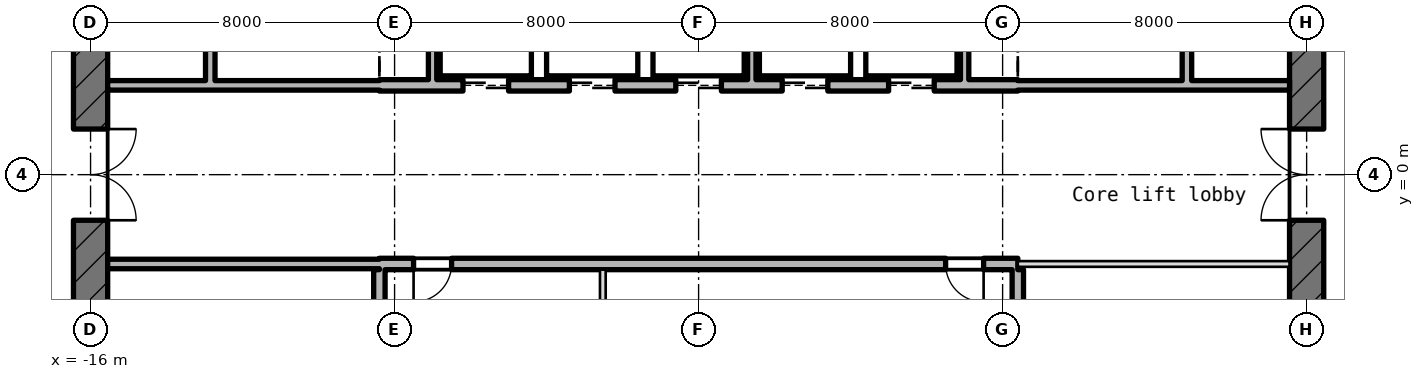
"""IFC4 building model, lengths in metres.
Left out: names, types, materials, properties, quantities, classifications, styles, units other than length and angle.
Written with IfcOpenShell. Run it as: python <this file> out.ifc"""

import sys

from ifc_helpers import new_model, si_unit, direction, frame, frame_2d, origin, place, context, subcontext, project, spatial, rectangle, extrude, element, fill, save


model = new_model("IFC4")
c1 = context("Model", 3, precision=1e-05, world=origin(), true_north=direction((0.0, 1.0)))
c2 = subcontext(c1, "Body", "Model", "MODEL_VIEW")
j1 = project(units=[si_unit("LENGTHUNIT", "METRE"), si_unit("PLANEANGLEUNIT", "RADIAN")], contexts=[c1])
p1 = place(None, origin())
s1 = spatial("IfcSite", under=j1, at=p1, CompositionType="ELEMENT")
p2 = place(p1, origin())
s2 = spatial("IfcBuilding", under=s1, at=p2, CompositionType="ELEMENT")
p3 = place(p2, frame((0.0, 0.0, 223.3)))
s3 = spatial("IfcBuildingStorey", under=s2, at=p3, CompositionType="ELEMENT", Elevation=223.3)
p4 = place(p3, frame((16.0, -10.186, -0.18), z_axis=(0.0, 0.0, 1.0), x_axis=(0.0, 1.0, 0.0)))
e1 = element("IfcWall", 1, at=p4, inside=s3, PredefinedType="SHEAR", context=c2, shape_type="SweptSolid", body=[
    extrude(rectangle(XDim=20.373, YDim=0.9, at=frame_2d((10.186, 0.0))), origin(), (0.0, 0.0, 1.0), 4.15),
])
p5 = place(p4, frame((8.986, 0.0, 0.18)))
e2 = element("IfcOpeningElement", 2, at=p5, cuts=e1, PredefinedType="OPENING", context=c2, shape_type="SweptSolid", body=[
    extrude(rectangle(XDim=2.4, YDim=2.1, at=frame_2d((1.2, 1.05))), frame((0.0, 0.46, 0.0), z_axis=(0.0, -1.0, 0.0), x_axis=(1.0, 0.0, 0.0)), (0.0, 0.0, 1.0), 0.92),
])
p6 = place(p4, frame((13.586, 0.0, 0.18)))
e3 = element("IfcOpeningElement", 3, at=p6, cuts=e1, PredefinedType="OPENING", context=c2, shape_type="SweptSolid", body=[
    extrude(rectangle(XDim=1.2, YDim=2.1, at=frame_2d((0.6, 1.05))), frame((0.0, 0.46, 0.0), z_axis=(0.0, -1.0, 0.0), x_axis=(1.0, 0.0, 0.0)), (0.0, 0.0, 1.0), 0.92),
])
p7 = place(p4, frame((2.4, 0.0, 0.18)))
e4 = element("IfcOpeningElement", 4, at=p7, cuts=e1, PredefinedType="OPENING", context=c2, shape_type="SweptSolid", body=[
    extrude(rectangle(XDim=1.2, YDim=2.1, at=frame_2d((0.6, 1.05))), frame((0.0, 0.46, 0.0), z_axis=(0.0, -1.0, 0.0), x_axis=(1.0, 0.0, 0.0)), (0.0, 0.0, 1.0), 0.92),
])
p8 = place(p3, frame((-16.0, 10.186, -0.18), z_axis=(0.0, 0.0, 1.0), x_axis=(0.0, -1.0, 0.0)))
e5 = element("IfcWall", 5, at=p8, inside=s3, PredefinedType="SHEAR", context=c2, shape_type="SweptSolid", body=[
    extrude(rectangle(XDim=20.373, YDim=0.9, at=frame_2d((10.186, 0.0))), origin(), (0.0, 0.0, 1.0), 4.15),
])
p9 = place(p8, frame((8.986, 0.0, 0.18)))
e6 = element("IfcOpeningElement", 6, at=p9, cuts=e5, PredefinedType="OPENING", context=c2, shape_type="SweptSolid", body=[
    extrude(rectangle(XDim=2.4, YDim=2.1, at=frame_2d((1.2, 1.05))), frame((0.0, 0.46, 0.0), z_axis=(0.0, -1.0, 0.0), x_axis=(1.0, 0.0, 0.0)), (0.0, 0.0, 1.0), 0.92),
])
p10 = place(p8, frame((5.586, 0.0, 0.18)))
e7 = element("IfcOpeningElement", 7, at=p10, cuts=e5, PredefinedType="OPENING", context=c2, shape_type="SweptSolid", body=[
    extrude(rectangle(XDim=1.2, YDim=2.1, at=frame_2d((0.6, 1.05))), frame((0.0, 0.46, 0.0), z_axis=(0.0, -1.0, 0.0), x_axis=(1.0, 0.0, 0.0)), (0.0, 0.0, 1.0), 0.92),
])
p11 = place(p3, frame((-15.55, -2.35, 0.0), z_axis=(0.0, 0.0, 1.0), x_axis=(1.0, 0.0, 0.0)))
e8 = element("IfcWall", 8, at=p11, inside=s3, PredefinedType="STANDARD", context=c2, shape_type="SweptSolid", body=[
    extrude(rectangle(XDim=7.15, YDim=0.25, at=frame_2d((3.575, 0.0))), origin(), (0.0, 0.0, 1.0), 3.97),
])
p12 = place(p3, frame((-8.4, -2.35, -0.18), z_axis=(0.0, 0.0, 1.0), x_axis=(1.0, 0.0, 0.0)))
e9 = element("IfcWall", 9, at=p12, inside=s3, PredefinedType="SHEAR", context=c2, shape_type="SweptSolid", body=[
    extrude(rectangle(XDim=16.8, YDim=0.3, at=frame_2d((8.4, 0.0))), origin(), (0.0, 0.0, 1.0), 4.15),
])
p13 = place(p12, frame((0.9, 0.0, 0.18)))
e10 = element("IfcOpeningElement", 10, at=p13, cuts=e9, PredefinedType="OPENING", context=c2, shape_type="SweptSolid", body=[
    extrude(rectangle(XDim=1.0, YDim=2.1, at=frame_2d((0.5, 1.05))), frame((0.0, 0.16, 0.0), z_axis=(0.0, -1.0, 0.0), x_axis=(1.0, 0.0, 0.0)), (0.0, 0.0, 1.0), 0.32),
])
p14 = place(p12, frame((14.9, 0.0, 0.18)))
e11 = element("IfcOpeningElement", 11, at=p14, cuts=e9, PredefinedType="OPENING", context=c2, shape_type="SweptSolid", body=[
    extrude(rectangle(XDim=1.0, YDim=2.1, at=frame_2d((0.5, 1.05))), frame((0.0, 0.16, 0.0), z_axis=(0.0, -1.0, 0.0), x_axis=(1.0, 0.0, 0.0)), (0.0, 0.0, 1.0), 0.32),
])
p15 = place(p3, frame((8.4, -2.35, 0.0), z_axis=(0.0, 0.0, 1.0), x_axis=(1.0, 0.0, 0.0)))
e12 = element("IfcWall", 12, at=p15, inside=s3, PredefinedType="PARTITIONING", context=c2, shape_type="SweptSolid", body=[
    extrude(rectangle(XDim=7.15, YDim=0.15, at=frame_2d((3.575, 0.0))), origin(), (0.0, 0.0, 1.0), 3.97),
])
p16 = place(p3, frame((-15.55, 2.35, 0.0), z_axis=(0.0, 0.0, 1.0), x_axis=(1.0, 0.0, 0.0)))
e13 = element("IfcWall", 13, at=p16, inside=s3, PredefinedType="STANDARD", context=c2, shape_type="SweptSolid", body=[
    extrude(rectangle(XDim=7.15, YDim=0.25, at=frame_2d((3.575, 0.0))), origin(), (0.0, 0.0, 1.0), 3.97),
])
p17 = place(p3, frame((-8.4, 2.35, -0.18), z_axis=(0.0, 0.0, 1.0), x_axis=(1.0, 0.0, 0.0)))
e14 = element("IfcWall", 14, at=p17, inside=s3, PredefinedType="SHEAR", context=c2, shape_type="SweptSolid", body=[
    extrude(rectangle(XDim=16.8, YDim=0.3, at=frame_2d((8.4, 0.0))), origin(), (0.0, 0.0, 1.0), 4.15),
])
p18 = place(p17, frame((2.2, 0.0, 0.18)))
e15 = element("IfcOpeningElement", 15, at=p18, cuts=e14, PredefinedType="OPENING", context=c2, shape_type="SweptSolid", body=[
    extrude(rectangle(XDim=1.2, YDim=2.1, at=frame_2d((0.6, 1.05))), frame((0.0, 0.16, 0.0), z_axis=(0.0, -1.0, 0.0), x_axis=(1.0, 0.0, 0.0)), (0.0, 0.0, 1.0), 0.32),
])
p19 = place(p17, frame((5.0, 0.0, 0.18)))
e16 = element("IfcOpeningElement", 16, at=p19, cuts=e14, PredefinedType="OPENING", context=c2, shape_type="SweptSolid", body=[
    extrude(rectangle(XDim=1.2, YDim=2.1, at=frame_2d((0.6, 1.05))), frame((0.0, 0.16, 0.0), z_axis=(0.0, -1.0, 0.0), x_axis=(1.0, 0.0, 0.0)), (0.0, 0.0, 1.0), 0.32),
])
p20 = place(p17, frame((7.8, 0.0, 0.18)))
e17 = element("IfcOpeningElement", 17, at=p20, cuts=e14, PredefinedType="OPENING", context=c2, shape_type="SweptSolid", body=[
    extrude(rectangle(XDim=1.2, YDim=2.1, at=frame_2d((0.6, 1.05))), frame((0.0, 0.16, 0.0), z_axis=(0.0, -1.0, 0.0), x_axis=(1.0, 0.0, 0.0)), (0.0, 0.0, 1.0), 0.32),
])
p21 = place(p17, frame((10.6, 0.0, 0.18)))
e18 = element("IfcOpeningElement", 18, at=p21, cuts=e14, PredefinedType="OPENING", context=c2, shape_type="SweptSolid", body=[
    extrude(rectangle(XDim=1.2, YDim=2.1, at=frame_2d((0.6, 1.05))), frame((0.0, 0.16, 0.0), z_axis=(0.0, -1.0, 0.0), x_axis=(1.0, 0.0, 0.0)), (0.0, 0.0, 1.0), 0.32),
])
p22 = place(p17, frame((13.4, 0.0, 0.18)))
e19 = element("IfcOpeningElement", 19, at=p22, cuts=e14, PredefinedType="OPENING", context=c2, shape_type="SweptSolid", body=[
    extrude(rectangle(XDim=1.2, YDim=2.1, at=frame_2d((0.6, 1.05))), frame((0.0, 0.16, 0.0), z_axis=(0.0, -1.0, 0.0), x_axis=(1.0, 0.0, 0.0)), (0.0, 0.0, 1.0), 0.32),
])
p23 = place(p3, frame((8.4, 2.35, 0.0), z_axis=(0.0, 0.0, 1.0), x_axis=(1.0, 0.0, 0.0)))
e20 = element("IfcWall", 20, at=p23, inside=s3, PredefinedType="STANDARD", context=c2, shape_type="SweptSolid", body=[
    extrude(rectangle(XDim=7.15, YDim=0.25, at=frame_2d((3.575, 0.0))), origin(), (0.0, 0.0, 1.0), 3.97),
])
p24 = place(p3, frame((-12.85, 2.475, 0.0), z_axis=(0.0, 0.0, 1.0), x_axis=(0.0, 1.0, 0.0)))
e21 = element("IfcWall", 21, at=p24, inside=s3, PredefinedType="STANDARD", context=c2, shape_type="SweptSolid", body=[
    extrude(rectangle(XDim=3.05, YDim=0.25, at=frame_2d((1.525, 0.0))), origin(), (0.0, 0.0, 1.0), 3.97),
])
p25 = place(p3, frame((-8.4, -8.75, -0.18), z_axis=(0.0, 0.0, 1.0), x_axis=(0.0, 1.0, 0.0)))
e22 = element("IfcWall", 22, at=p25, inside=s3, PredefinedType="SHEAR", context=c2, shape_type="SweptSolid", body=[
    extrude(rectangle(XDim=6.25, YDim=0.3, at=frame_2d((3.125, 0.0))), origin(), (0.0, 0.0, 1.0), 4.15),
])
p26 = place(p3, frame((-7.0, 2.5, 0.0), z_axis=(0.0, 0.0, 1.0), x_axis=(0.0, 1.0, 0.0)))
e23 = element("IfcWall", 23, at=p26, inside=s3, PredefinedType="STANDARD", context=c2, shape_type="SweptSolid", body=[
    extrude(rectangle(XDim=2.74, YDim=0.22, at=frame_2d((1.37, 0.0))), origin(), (0.0, 0.0, 1.0), 3.97),
])
p27 = place(p3, frame((-2.52, -5.24, 0.0), z_axis=(0.0, 0.0, 1.0), x_axis=(0.0, 1.0, 0.0)))
e24 = element("IfcWall", 24, at=p27, inside=s3, PredefinedType="PARTITIONING", context=c2, shape_type="SweptSolid", body=[
    extrude(rectangle(XDim=2.74, YDim=0.15, at=frame_2d((1.37, 0.0))), origin(), (0.0, 0.0, 1.0), 3.97),
])
for number, where, z_axis, x_axis in (
    (25, (1.4, 2.5, 0.0), (0.0, 0.0, 1.0), (0.0, 1.0, 0.0)),
    (26, (7.0, 2.5, 0.0), (0.0, 0.0, 1.0), (0.0, 1.0, 0.0)),
):
    element("IfcWall", number, at=place(p3, frame(where, z_axis=z_axis, x_axis=x_axis)), inside=s3, PredefinedType="STANDARD", context=c2, shape_type="SweptSolid", body=[
        extrude(rectangle(XDim=2.74, YDim=0.22, at=frame_2d((1.37, 0.0))), origin(), (0.0, 0.0, 1.0), 3.97),
    ])
p28 = place(p3, frame((8.4, -8.35, -0.18), z_axis=(0.0, 0.0, 1.0), x_axis=(0.0, 1.0, 0.0)))
e27 = element("IfcWall", 27, at=p28, inside=s3, PredefinedType="SHEAR", context=c2, shape_type="SweptSolid", body=[
    extrude(rectangle(XDim=5.85, YDim=0.3, at=frame_2d((2.925, 0.0))), origin(), (0.0, 0.0, 1.0), 4.15),
])
p29 = place(p3, frame((12.85, 2.475, 0.0), z_axis=(0.0, 0.0, 1.0), x_axis=(0.0, 1.0, 0.0)))
e28 = element("IfcWall", 28, at=p29, inside=s3, PredefinedType="STANDARD", context=c2, shape_type="SweptSolid", body=[
    extrude(rectangle(XDim=3.05, YDim=0.25, at=frame_2d((1.525, 0.0))), origin(), (0.0, 0.0, 1.0), 3.97),
])
p30 = place(p18, origin())
e29 = element("IfcDoor", 29, at=p30, inside=s3, OperationType="DOUBLE_DOOR_SLIDING", PredefinedType="DOOR", context=c2, shape_type="SweptSolid", body=[
    extrude(rectangle(XDim=1.2, YDim=2.1, at=frame_2d((0.6, 1.05))), frame((0.0, 0.025, 0.0), z_axis=(0.0, -1.0, 0.0), x_axis=(1.0, 0.0, 0.0)), (0.0, 0.0, 1.0), 0.05),
])
fill(e15, e29)
p31 = place(p19, origin())
e30 = element("IfcDoor", 30, at=p31, inside=s3, OperationType="DOUBLE_DOOR_SLIDING", PredefinedType="DOOR", context=c2, shape_type="SweptSolid", body=[
    extrude(rectangle(XDim=1.2, YDim=2.1, at=frame_2d((0.6, 1.05))), frame((0.0, 0.025, 0.0), z_axis=(0.0, -1.0, 0.0), x_axis=(1.0, 0.0, 0.0)), (0.0, 0.0, 1.0), 0.05),
])
fill(e16, e30)
p32 = place(p20, origin())
e31 = element("IfcDoor", 31, at=p32, inside=s3, OperationType="DOUBLE_DOOR_SLIDING", PredefinedType="DOOR", context=c2, shape_type="SweptSolid", body=[
    extrude(rectangle(XDim=1.2, YDim=2.1, at=frame_2d((0.6, 1.05))), frame((0.0, 0.025, 0.0), z_axis=(0.0, -1.0, 0.0), x_axis=(1.0, 0.0, 0.0)), (0.0, 0.0, 1.0), 0.05),
])
fill(e17, e31)
p33 = place(p21, origin())
e32 = element("IfcDoor", 32, at=p33, inside=s3, OperationType="DOUBLE_DOOR_SLIDING", PredefinedType="DOOR", context=c2, shape_type="SweptSolid", body=[
    extrude(rectangle(XDim=1.2, YDim=2.1, at=frame_2d((0.6, 1.05))), frame((0.0, 0.025, 0.0), z_axis=(0.0, -1.0, 0.0), x_axis=(1.0, 0.0, 0.0)), (0.0, 0.0, 1.0), 0.05),
])
fill(e18, e32)
p34 = place(p22, origin())
e33 = element("IfcDoor", 33, at=p34, inside=s3, OperationType="DOUBLE_DOOR_SLIDING", PredefinedType="DOOR", context=c2, shape_type="SweptSolid", body=[
    extrude(rectangle(XDim=1.2, YDim=2.1, at=frame_2d((0.6, 1.05))), frame((0.0, 0.025, 0.0), z_axis=(0.0, -1.0, 0.0), x_axis=(1.0, 0.0, 0.0)), (0.0, 0.0, 1.0), 0.05),
])
fill(e19, e33)
p35 = place(p9, origin())
e34 = element("IfcDoor", 34, at=p35, inside=s3, OperationType="DOUBLE_DOOR_SINGLE_SWING", PredefinedType="DOOR", context=c2, shape_type="SweptSolid", body=[
    extrude(rectangle(XDim=2.4, YDim=2.1, at=frame_2d((1.2, 1.05))), frame((0.0, 0.025, 0.0), z_axis=(0.0, -1.0, 0.0), x_axis=(1.0, 0.0, 0.0)), (0.0, 0.0, 1.0), 0.05),
])
fill(e6, e34)
p36 = place(p5, origin())
e35 = element("IfcDoor", 35, at=p36, inside=s3, OperationType="DOUBLE_DOOR_SINGLE_SWING", PredefinedType="DOOR", context=c2, shape_type="SweptSolid", body=[
    extrude(rectangle(XDim=2.4, YDim=2.1, at=frame_2d((1.2, 1.05))), frame((0.0, 0.025, 0.0), z_axis=(0.0, -1.0, 0.0), x_axis=(1.0, 0.0, 0.0)), (0.0, 0.0, 1.0), 0.05),
])
fill(e2, e35)
p37 = place(p13, frame((1.0, 0.0, 0.0), z_axis=(0.0, 0.0, 1.0), x_axis=(-1.0, 0.0, 0.0)))
e36 = element("IfcDoor", 36, at=p37, inside=s3, OperationType="SINGLE_SWING_LEFT", PredefinedType="DOOR", context=c2, shape_type="SweptSolid", body=[
    extrude(rectangle(XDim=1.0, YDim=2.1, at=frame_2d((0.5, 1.05))), frame((0.0, 0.025, 0.0), z_axis=(0.0, -1.0, 0.0), x_axis=(1.0, 0.0, 0.0)), (0.0, 0.0, 1.0), 0.05),
])
fill(e10, e36)
p38 = place(p14, frame((1.0, 0.0, 0.0), z_axis=(0.0, 0.0, 1.0), x_axis=(-1.0, 0.0, 0.0)))
e37 = element("IfcDoor", 37, at=p38, inside=s3, OperationType="SINGLE_SWING_LEFT", PredefinedType="DOOR", context=c2, shape_type="SweptSolid", body=[
    extrude(rectangle(XDim=1.0, YDim=2.1, at=frame_2d((0.5, 1.05))), frame((0.0, 0.025, 0.0), z_axis=(0.0, -1.0, 0.0), x_axis=(1.0, 0.0, 0.0)), (0.0, 0.0, 1.0), 0.05),
])
fill(e11, e37)
save(model, sys.argv[1])
